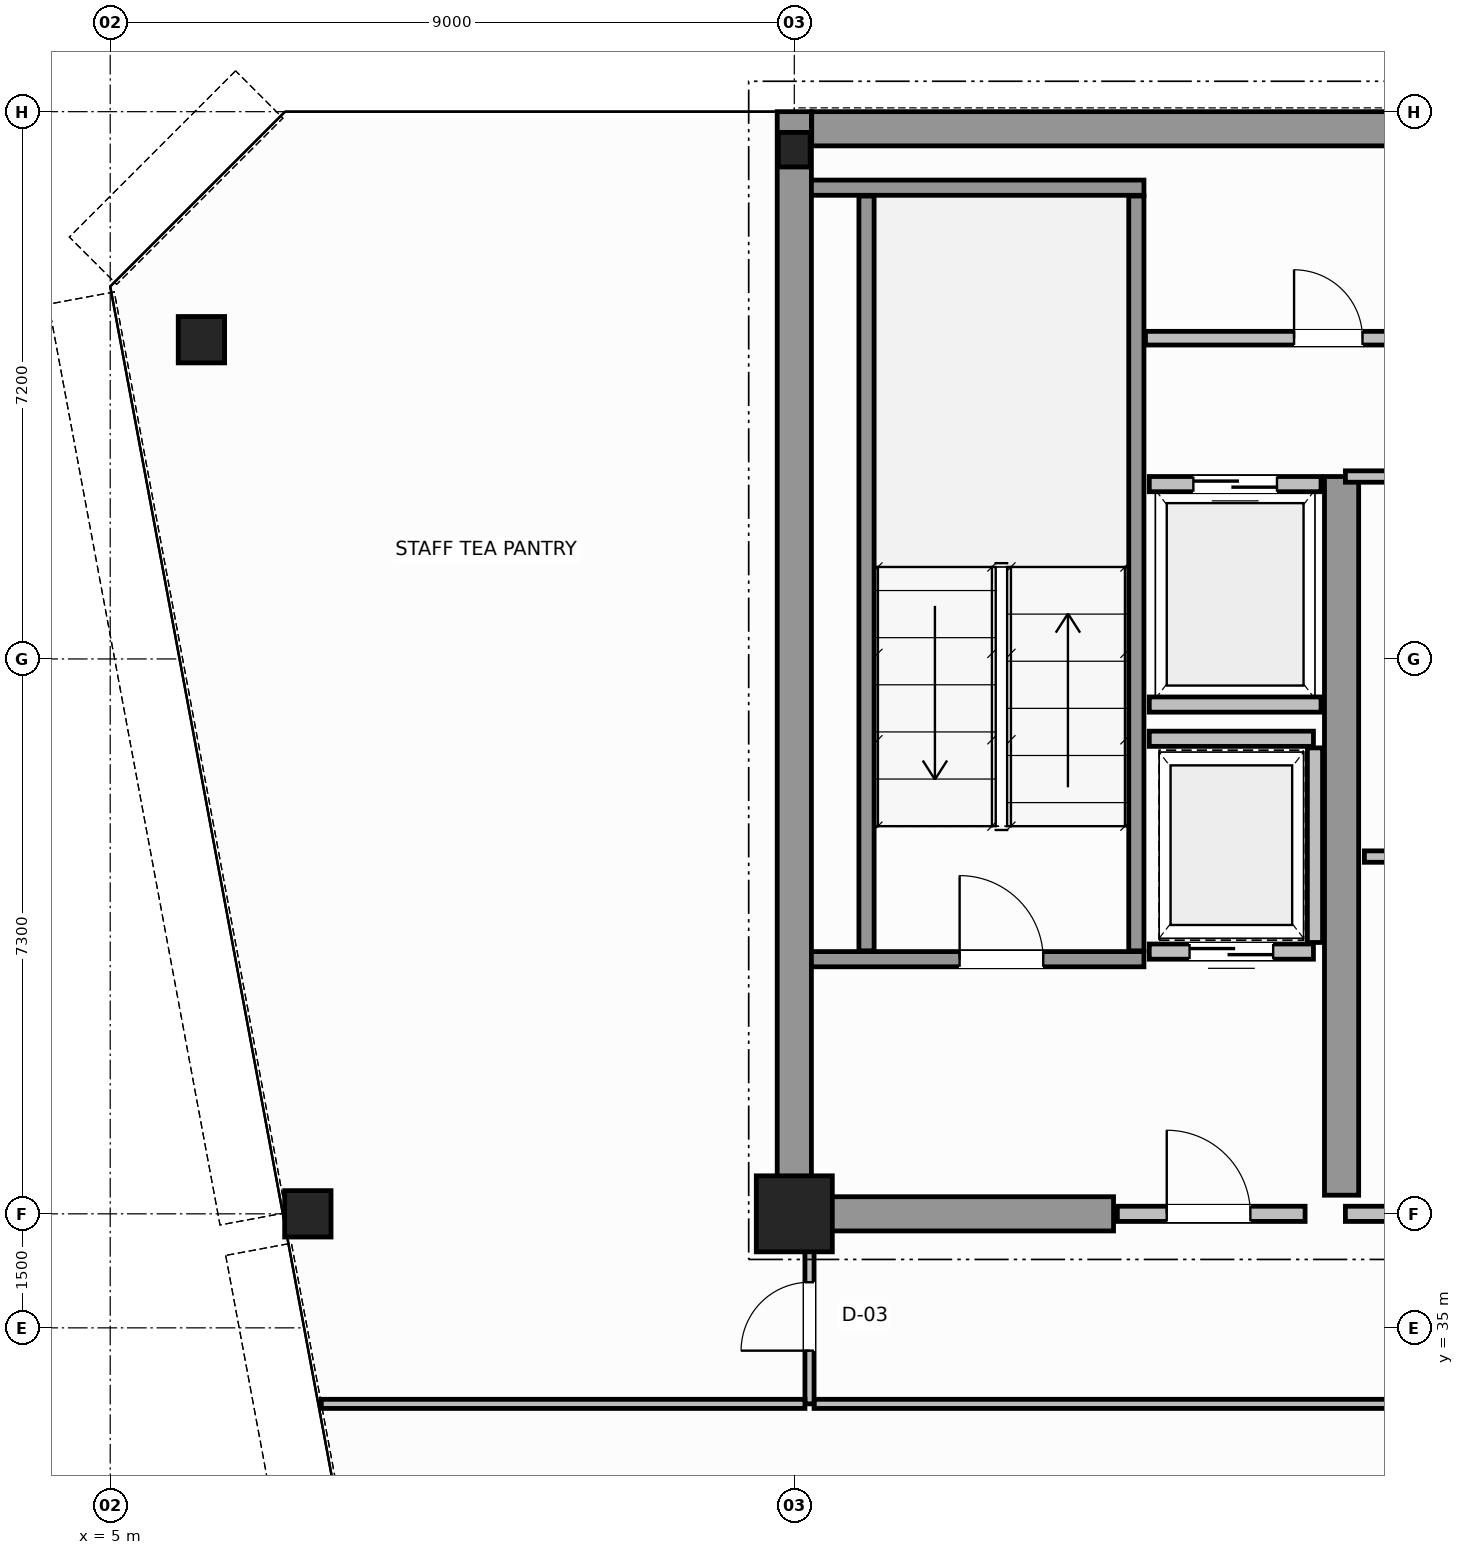
"""IFC4 building model, lengths in metres.
Left out: names, types, materials, properties, quantities, classifications, styles, units other than length and angle.
Written with IfcOpenShell. Run it as: python <this file> out.ifc"""

import sys

from ifc_helpers import new_model, si_unit, direction, frame, frame_2d, origin, origin_2d, place, context, subcontext, project, spatial, rectangle, hollow_circle, i_section, extrude, source, transform, mapped, element, fill, save


model = new_model("IFC4")
c1 = context("Model", 3, precision=1e-05, world=origin(), true_north=direction((0.0, 1.0)))
c2 = subcontext(c1, "Body", "Model", "MODEL_VIEW")
j1 = project(units=[si_unit("LENGTHUNIT", "METRE"), si_unit("PLANEANGLEUNIT", "RADIAN")], contexts=[c1])
p1 = place(None, origin())
s1 = spatial("IfcSite", under=j1, at=p1, CompositionType="ELEMENT")
p2 = place(p1, origin())
s2 = spatial("IfcBuilding", under=s1, at=p2, CompositionType="ELEMENT")
p3 = place(p2, frame((0.0, 0.0, 253.6)))
s3 = spatial("IfcBuildingStorey", under=s2, at=p3, CompositionType="ELEMENT", Elevation=253.6)
m1 = source(origin(), c2, "Body", "SweptSolid", [
    extrude(rectangle(XDim=1.0, YDim=1.0, at=origin_2d()), origin(), (0.0, 0.0, 1.0), 3.8),
])
p4 = place(p3, frame((14.0, 36.5, 0.0), z_axis=(0.0, 0.0, 1.0), x_axis=(1.0, 0.0, 0.0)))
e1 = element("IfcColumn", 1, at=p4, inside=s3, PredefinedType="COLUMN", context=c2, shape_type="MappedRepresentation", body=[
    mapped(m1, transform((0.0, 0.0, 0.0), scale=1.0)),
])
m2 = source(origin(), c2, "Body", "SweptSolid", [
    extrude(i_section(OverallWidth=0.418, OverallDepth=0.455, WebThickness=0.042, FlangeThickness=0.058, FilletRadius=0.015, at=origin_2d()), origin(), (0.0, 0.0, 1.0), 3.8),
])
p5 = place(p3, frame((14.0, 50.5, 0.0), z_axis=(0.0, 0.0, 1.0), x_axis=(1.0, 0.0, 0.0)))
e2 = element("IfcColumn", 2, at=p5, inside=s3, PredefinedType="COLUMN", context=c2, shape_type="MappedRepresentation", body=[
    mapped(m2, transform((0.0, 0.0, 0.0), scale=1.0)),
])
m3 = source(origin(), c2, "Body", "SweptSolid", [
    extrude(hollow_circle(Radius=0.305, WallThickness=0.03, at=origin_2d()), origin(), (0.0, 0.0, 1.0), 3.8),
])
for number, where, z_axis, x_axis in (
    (3, (6.2, 48.0, 0.0), (0.0, 0.0, 1.0), (1.0, 0.0, 0.0)),
    (4, (7.6, 36.5, 0.0), (0.0, 0.0, 1.0), (1.0, 0.0, 0.0)),
):
    element("IfcColumn", number, at=place(p3, frame(where, z_axis=z_axis, x_axis=x_axis)), inside=s3, PredefinedType="COLUMN", context=c2, shape_type="MappedRepresentation", body=[
        mapped(m3, transform((0.0, 0.0, 0.0), scale=1.0)),
    ])
p6 = place(p3, frame((14.229, 50.775, 0.0), z_axis=(0.0, 0.0, 1.0), x_axis=(1.0, 0.0, 0.0)))
e5 = element("IfcWall", 5, at=p6, inside=s3, PredefinedType="SHEAR", context=c2, shape_type="SweptSolid", body=[
    extrude(rectangle(XDim=19.769, YDim=0.45, at=frame_2d((9.885, 0.0))), origin(), (0.0, 0.0, 1.0), 3.8),
])
p7 = place(p3, frame((14.0, 36.5, 0.0), z_axis=(0.0, 0.0, 1.0), x_axis=(0.0, 1.0, 0.0)))
e6 = element("IfcWall", 6, at=p7, inside=s3, PredefinedType="SHEAR", context=c2, shape_type="SweptSolid", body=[
    extrude(rectangle(XDim=14.5, YDim=0.45, at=frame_2d((7.25, 0.0))), origin(), (0.0, 0.0, 1.0), 3.8),
])
p8 = place(p3, frame((14.245, 36.5, 0.0), z_axis=(0.0, 0.0, 1.0), x_axis=(1.0, 0.0, 0.0)))
e7 = element("IfcWall", 7, at=p8, inside=s3, PredefinedType="SHEAR", context=c2, shape_type="SweptSolid", body=[
    extrude(rectangle(XDim=3.955, YDim=0.45, at=frame_2d((1.978, 0.0))), origin(), (0.0, 0.0, 1.0), 2.58),
])
p9 = place(p3, frame((21.2, 36.745, 0.0), z_axis=(0.0, 0.0, 1.0), x_axis=(0.0, 1.0, 0.0)))
e8 = element("IfcWall", 8, at=p9, inside=s3, PredefinedType="SHEAR", context=c2, shape_type="SweptSolid", body=[
    extrude(rectangle(XDim=9.455, YDim=0.45, at=frame_2d((4.728, 0.0))), origin(), (0.0, 0.0, 1.0), 3.8),
])
p10 = place(p3, frame((14.225, 39.85, 0.0), z_axis=(0.0, 0.0, 1.0), x_axis=(1.0, 0.0, 0.0)))
e9 = element("IfcWall", 9, at=p10, inside=s3, PredefinedType="SOLIDWALL", context=c2, shape_type="SweptSolid", body=[
    extrude(rectangle(XDim=4.375, YDim=0.2, at=frame_2d((2.188, 0.0))), origin(), (0.0, 0.0, 1.0), 3.8),
])
p11 = place(p10, frame((1.95, 0.0, 0.0)))
e10 = element("IfcOpeningElement", 10, at=p11, cuts=e9, PredefinedType="OPENING", context=c2, shape_type="SweptSolid", body=[
    extrude(rectangle(XDim=1.1, YDim=2.15, at=frame_2d((0.55, 1.075))), frame((0.0, 0.11, 0.0), z_axis=(0.0, -1.0, 0.0), x_axis=(1.0, 0.0, 0.0)), (0.0, 0.0, 1.0), 0.22),
])
p12 = place(p3, frame((14.225, 50.0, 0.0), z_axis=(0.0, 0.0, 1.0), x_axis=(1.0, 0.0, 0.0)))
e11 = element("IfcWall", 11, at=p12, inside=s3, PredefinedType="SOLIDWALL", context=c2, shape_type="SweptSolid", body=[
    extrude(rectangle(XDim=4.375, YDim=0.2, at=frame_2d((2.188, 0.0))), origin(), (0.0, 0.0, 1.0), 3.8),
])
for number, where, z_axis, x_axis in (
    (12, (14.95, 39.96, 0.0), (0.0, 0.0, 1.0), (0.0, 1.0, 0.0)),
    (13, (18.5, 39.96, 0.0), (0.0, 0.0, 1.0), (0.0, 1.0, 0.0)),
):
    element("IfcWall", number, at=place(p3, frame(where, z_axis=z_axis, x_axis=x_axis)), inside=s3, PredefinedType="SOLIDWALL", context=c2, shape_type="SweptSolid", body=[
        extrude(rectangle(XDim=9.93, YDim=0.2, at=frame_2d((4.965, 0.0))), origin(), (0.0, 0.0, 1.0), 3.8),
    ])
p13 = place(p3, frame((18.25, 36.5, 0.0), z_axis=(0.0, 0.0, 1.0), x_axis=(1.0, 0.0, 0.0)))
e14 = element("IfcWall", 14, at=p13, inside=s3, PredefinedType="SOLIDWALL", context=c2, shape_type="SweptSolid", body=[
    extrude(rectangle(XDim=2.47, YDim=0.2, at=frame_2d((1.235, 0.0))), origin(), (0.0, 0.0, 1.0), 2.57),
])
p14 = place(p13, frame((0.65, 0.0, 0.0)))
e15 = element("IfcOpeningElement", 15, at=p14, cuts=e14, PredefinedType="OPENING", context=c2, shape_type="SweptSolid", body=[
    extrude(rectangle(XDim=1.1, YDim=2.15, at=frame_2d((0.55, 1.075))), frame((0.0, 0.11, 0.0), z_axis=(0.0, -1.0, 0.0), x_axis=(1.0, 0.0, 0.0)), (0.0, 0.0, 1.0), 0.22),
])
p15 = place(p3, frame((18.67, 46.1, 0.0), z_axis=(0.0, 0.0, 1.0), x_axis=(1.0, 0.0, 0.0)))
e16 = element("IfcWall", 16, at=p15, inside=s3, PredefinedType="SOLIDWALL", context=c2, shape_type="SweptSolid", body=[
    extrude(rectangle(XDim=2.26, YDim=0.2, at=frame_2d((1.13, 0.0))), origin(), (0.0, 0.0, 1.0), 3.58),
])
p16 = place(p15, frame((0.58, 0.0, 0.0)))
e17 = element("IfcOpeningElement", 17, at=p16, cuts=e16, PredefinedType="OPENING", context=c2, shape_type="SweptSolid", body=[
    extrude(rectangle(XDim=1.1, YDim=2.15, at=frame_2d((0.55, 1.075))), frame((0.0, 0.11, 0.0), z_axis=(0.0, -1.0, 0.0), x_axis=(1.0, 0.0, 0.0)), (0.0, 0.0, 1.0), 0.22),
])
p17 = place(p3, frame((18.67, 43.2, 0.0), z_axis=(0.0, 0.0, 1.0), x_axis=(1.0, 0.0, 0.0)))
e18 = element("IfcWall", 18, at=p17, inside=s3, PredefinedType="SOLIDWALL", context=c2, shape_type="SweptSolid", body=[
    extrude(rectangle(XDim=2.26, YDim=0.2, at=frame_2d((1.13, 0.0))), origin(), (0.0, 0.0, 1.0), 3.58),
])
p18 = place(p3, frame((18.67, 39.95, 0.0), z_axis=(0.0, 0.0, 1.0), x_axis=(1.0, 0.0, 0.0)))
e19 = element("IfcWall", 19, at=p18, inside=s3, PredefinedType="SOLIDWALL", context=c2, shape_type="SweptSolid", body=[
    extrude(rectangle(XDim=2.16, YDim=0.2, at=frame_2d((1.08, 0.0))), origin(), (0.0, 0.0, 1.0), 3.58),
])
p19 = place(p18, frame((0.53, 0.0, 0.0)))
e20 = element("IfcOpeningElement", 20, at=p19, cuts=e19, PredefinedType="OPENING", context=c2, shape_type="SweptSolid", body=[
    extrude(rectangle(XDim=1.1, YDim=2.15, at=frame_2d((0.55, 1.075))), frame((0.0, 0.11, 0.0), z_axis=(0.0, -1.0, 0.0), x_axis=(1.0, 0.0, 0.0)), (0.0, 0.0, 1.0), 0.22),
])
p20 = place(p3, frame((18.67, 42.75, 0.0), z_axis=(0.0, 0.0, 1.0), x_axis=(1.0, 0.0, 0.0)))
e21 = element("IfcWall", 21, at=p20, inside=s3, PredefinedType="SOLIDWALL", context=c2, shape_type="SweptSolid", body=[
    extrude(rectangle(XDim=2.16, YDim=0.2, at=frame_2d((1.08, 0.0))), origin(), (0.0, 0.0, 1.0), 3.58),
])
p21 = place(p3, frame((20.85, 40.07, 0.0), z_axis=(0.0, 0.0, 1.0), x_axis=(0.0, 1.0, 0.0)))
e22 = element("IfcWall", 22, at=p21, inside=s3, PredefinedType="SOLIDWALL", context=c2, shape_type="SweptSolid", body=[
    extrude(rectangle(XDim=2.56, YDim=0.2, at=frame_2d((1.28, 0.0))), origin(), (0.0, 0.0, 1.0), 3.58),
])
p22 = place(p3, frame((21.25, 36.5, 0.0), z_axis=(0.0, 0.0, 1.0), x_axis=(1.0, 0.0, 0.0)))
e23 = element("IfcWall", 23, at=p22, inside=s3, PredefinedType="SOLIDWALL", context=c2, shape_type="SweptSolid", body=[
    extrude(rectangle(XDim=6.27, YDim=0.2, at=frame_2d((3.135, 0.0))), origin(), (0.0, 0.0, 1.0), 2.57),
])
p23 = place(p22, frame((2.6, 0.0, 0.0)))
e24 = element("IfcOpeningElement", 24, at=p23, cuts=e23, PredefinedType="OPENING", context=c2, shape_type="SweptSolid", body=[
    extrude(rectangle(XDim=1.1, YDim=2.15, at=frame_2d((0.55, 1.075))), frame((0.0, 0.11, 0.0), z_axis=(0.0, -1.0, 0.0), x_axis=(1.0, 0.0, 0.0)), (0.0, 0.0, 1.0), 0.22),
])
p24 = place(p3, frame((21.25, 46.2, 0.0), z_axis=(0.0, 0.0, 1.0), x_axis=(1.0, 0.0, 0.0)))
e25 = element("IfcWall", 25, at=p24, inside=s3, PredefinedType="PARTITIONING", context=c2, shape_type="SweptSolid", body=[
    extrude(rectangle(XDim=8.5, YDim=0.15, at=frame_2d((4.25, 0.0))), origin(), (0.0, 0.0, 1.0), 3.58),
])
p25 = place(p3, frame((21.5, 41.2, 0.0), z_axis=(0.0, 0.0, 1.0), x_axis=(1.0, 0.0, 0.0)))
e26 = element("IfcWall", 26, at=p25, inside=s3, PredefinedType="PARTITIONING", context=c2, shape_type="SweptSolid", body=[
    extrude(rectangle(XDim=8.0, YDim=0.15, at=frame_2d((4.0, 0.0))), origin(), (0.0, 0.0, 1.0), 3.58),
])
p26 = place(p25, frame((3.4, 0.0, 0.0)))
e27 = element("IfcOpeningElement", 27, at=p26, cuts=e26, PredefinedType="OPENING", context=c2, shape_type="SweptSolid", body=[
    extrude(rectangle(XDim=0.9, YDim=2.1, at=frame_2d((0.45, 1.05))), frame((0.0, 0.085, 0.0), z_axis=(0.0, -1.0, 0.0), x_axis=(1.0, 0.0, 0.0)), (0.0, 0.0, 1.0), 0.17),
])
p27 = place(p3, frame((18.62, 48.02, 0.0), z_axis=(0.0, 0.0, 1.0), x_axis=(1.0, 0.0, 0.0)))
e28 = element("IfcWall", 28, at=p27, inside=s3, PredefinedType="PLUMBINGWALL", context=c2, shape_type="SweptSolid", body=[
    extrude(rectangle(XDim=30.76, YDim=0.18, at=frame_2d((15.38, 0.0))), origin(), (0.0, 0.0, 1.0), 3.58),
])
p28 = place(p27, frame((1.955, 0.0, 0.0)))
e29 = element("IfcOpeningElement", 29, at=p28, cuts=e28, PredefinedType="OPENING", context=c2, shape_type="SweptSolid", body=[
    extrude(rectangle(XDim=0.9, YDim=2.15, at=frame_2d((0.45, 1.075))), frame((0.0, 0.1, 0.0), z_axis=(0.0, -1.0, 0.0), x_axis=(1.0, 0.0, 0.0)), (0.0, 0.0, 1.0), 0.2),
])
p29 = place(p27, frame((8.03, 0.0, 0.0)))
e30 = element("IfcOpeningElement", 30, at=p29, cuts=e28, PredefinedType="OPENING", context=c2, shape_type="SweptSolid", body=[
    extrude(rectangle(XDim=0.9, YDim=2.15, at=frame_2d((0.45, 1.075))), frame((0.0, 0.1, 0.0), z_axis=(0.0, -1.0, 0.0), x_axis=(1.0, 0.0, 0.0)), (0.0, 0.0, 1.0), 0.2),
])
p30 = place(p27, frame((16.93, 0.0, 0.0)))
e31 = element("IfcOpeningElement", 31, at=p30, cuts=e28, PredefinedType="OPENING", context=c2, shape_type="SweptSolid", body=[
    extrude(rectangle(XDim=0.9, YDim=2.15, at=frame_2d((0.45, 1.075))), frame((0.0, 0.1, 0.0), z_axis=(0.0, -1.0, 0.0), x_axis=(1.0, 0.0, 0.0)), (0.0, 0.0, 1.0), 0.2),
])
p31 = place(p27, frame((26.205, 0.0, 0.0)))
e32 = element("IfcOpeningElement", 32, at=p31, cuts=e28, PredefinedType="OPENING", context=c2, shape_type="SweptSolid", body=[
    extrude(rectangle(XDim=0.9, YDim=2.15, at=frame_2d((0.45, 1.075))), frame((0.0, 0.1, 0.0), z_axis=(0.0, -1.0, 0.0), x_axis=(1.0, 0.0, 0.0)), (0.0, 0.0, 1.0), 0.2),
])
p32 = place(p3, frame((14.26, 34.0, 0.0), z_axis=(0.0, 0.0, 1.0), x_axis=(1.0, 0.0, 0.0)))
e33 = element("IfcWall", 33, at=p32, inside=s3, PredefinedType="PARTITIONING", context=c2, shape_type="SweptSolid", body=[
    extrude(rectangle(XDim=26.48, YDim=0.12, at=frame_2d((13.24, 0.0))), origin(), (0.0, 0.0, 1.0), 3.58),
])
p33 = place(p3, frame((14.2, 34.0, 0.0), z_axis=(0.0, 0.0, 1.0), x_axis=(0.0, 1.0, 0.0)))
e34 = element("IfcWall", 34, at=p33, inside=s3, PredefinedType="PARTITIONING", context=c2, shape_type="SweptSolid", body=[
    extrude(rectangle(XDim=2.44, YDim=0.12, at=frame_2d((1.22, 0.0))), origin(), (0.0, 0.0, 1.0), 3.58),
])
p34 = place(p33, frame((0.7, 0.0, 0.0)))
e35 = element("IfcOpeningElement", 35, at=p34, cuts=e34, PredefinedType="OPENING", context=c2, shape_type="SweptSolid", body=[
    extrude(rectangle(XDim=0.9, YDim=2.15, at=frame_2d((0.45, 1.075))), frame((0.0, 0.07, 0.0), z_axis=(0.0, -1.0, 0.0), x_axis=(1.0, 0.0, 0.0)), (0.0, 0.0, 1.0), 0.14),
])
p35 = place(p3, frame((7.777, 34.0, 0.0), z_axis=(0.0, 0.0, 1.0), x_axis=(1.0, 0.0, 0.0)))
e36 = element("IfcWall", 36, at=p35, inside=s3, PredefinedType="PARTITIONING", context=c2, shape_type="SweptSolid", body=[
    extrude(rectangle(XDim=6.363, YDim=0.12, at=frame_2d((3.181, 0.0))), origin(), (0.0, 0.0, 1.0), 3.58),
])
m4 = source(origin(), c2, "Body", "SweptSolid", [
    extrude(rectangle(XDim=1.1, YDim=2.15, at=frame_2d((0.55, 1.075))), frame((0.0, 0.025, 0.0), z_axis=(0.0, -1.0, 0.0), x_axis=(1.0, 0.0, 0.0)), (0.0, 0.0, 1.0), 0.05),
])
p36 = place(p11, origin())
e37 = element("IfcDoor", 37, at=p36, inside=s3, OperationType="SINGLE_SWING_LEFT", PredefinedType="DOOR", context=c2, shape_type="MappedRepresentation", body=[
    mapped(m4, transform((0.0, 0.0, 0.0), scale=1.0)),
])
fill(e10, e37)
p37 = place(p14, origin())
e38 = element("IfcDoor", 38, at=p37, inside=s3, OperationType="SINGLE_SWING_RIGHT", PredefinedType="DOOR", context=c2, shape_type="MappedRepresentation", body=[
    mapped(m4, transform((0.0, 0.0, 0.0), scale=1.0)),
])
fill(e15, e38)
p38 = place(p16, origin())
e39 = element("IfcDoor", 39, at=p38, inside=s3, OperationType="DOUBLE_DOOR_SLIDING", PredefinedType="DOOR", context=c2, shape_type="MappedRepresentation", body=[
    mapped(m4, transform((0.0, 0.0, 0.0), scale=1.0)),
])
fill(e17, e39)
p39 = place(p19, origin())
e40 = element("IfcDoor", 40, at=p39, inside=s3, OperationType="DOUBLE_DOOR_SLIDING", PredefinedType="DOOR", context=c2, shape_type="MappedRepresentation", body=[
    mapped(m4, transform((0.0, 0.0, 0.0), scale=1.0)),
])
fill(e20, e40)
m5 = source(origin(), c2, "Body", "SweptSolid", [
    extrude(rectangle(XDim=0.9, YDim=2.15, at=frame_2d((0.45, 1.075))), frame((0.0, 0.025, 0.0), z_axis=(0.0, -1.0, 0.0), x_axis=(1.0, 0.0, 0.0)), (0.0, 0.0, 1.0), 0.05),
])
p40 = place(p28, origin())
e41 = element("IfcDoor", 41, at=p40, inside=s3, OperationType="SINGLE_SWING_LEFT", PredefinedType="DOOR", context=c2, shape_type="MappedRepresentation", body=[
    mapped(m5, transform((0.0, 0.0, 0.0), scale=1.0)),
])
fill(e29, e41)
p41 = place(p34, origin())
e42 = element("IfcDoor", 42, at=p41, inside=s3, OperationType="SINGLE_SWING_LEFT", PredefinedType="DOOR", context=c2, shape_type="MappedRepresentation", body=[
    mapped(m5, transform((0.0, 0.0, 0.0), scale=1.0)),
])
fill(e35, e42)
save(model, sys.argv[1])
